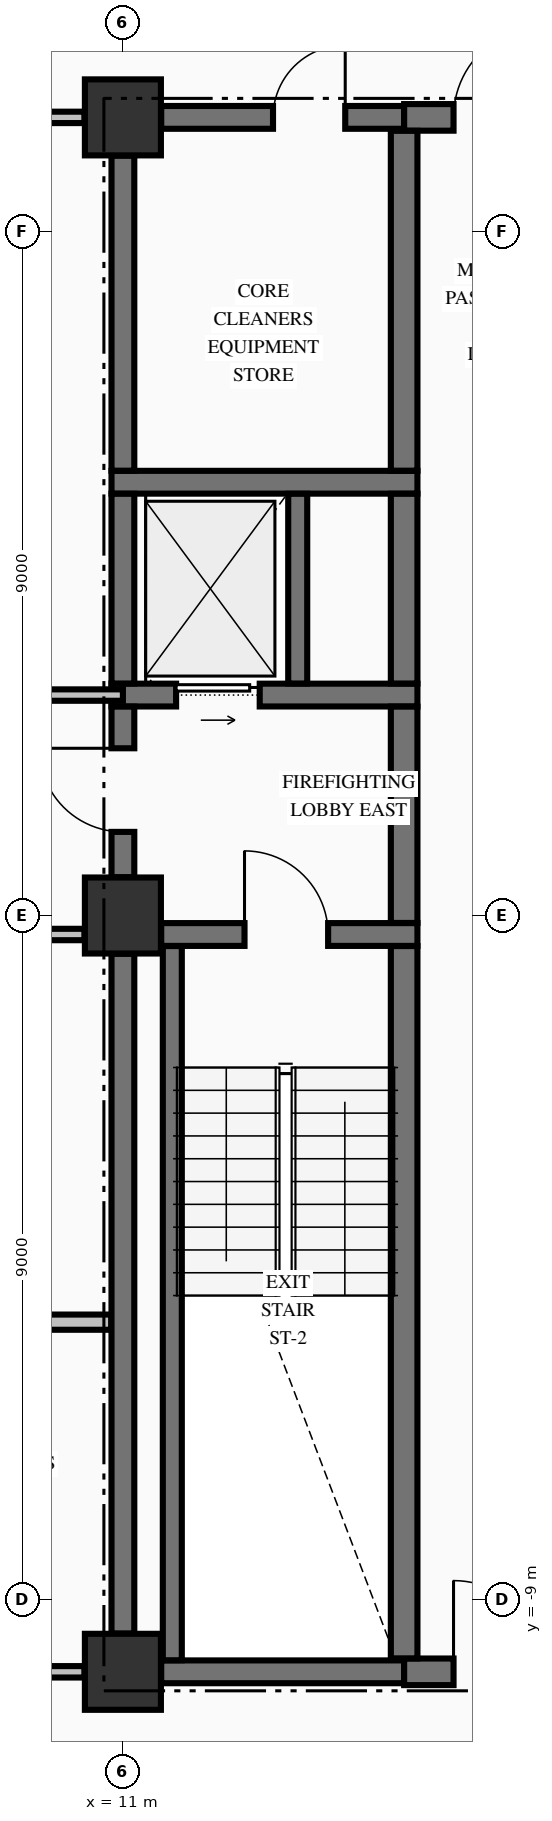
"""IFC4 building model, lengths in metres.
Left out: names, types, materials, properties, quantities, classifications, styles, units other than length and angle.
Written with IfcOpenShell. Run it as: python <this file> out.ifc"""

import sys

from ifc_helpers import new_model, si_unit, direction, frame, frame_2d, origin, origin_2d, place, context, subcontext, project, spatial, rectangle, extrude, element, fill, save


model = new_model("IFC4")
c1 = context("Model", 3, precision=1e-05, world=origin(), true_north=direction((0.0, 1.0)))
c2 = subcontext(c1, "Body", "Model", "MODEL_VIEW")
j1 = project(units=[si_unit("LENGTHUNIT", "METRE"), si_unit("PLANEANGLEUNIT", "RADIAN")], contexts=[c1])
p1 = place(None, origin())
s1 = spatial("IfcSite", under=j1, at=p1, CompositionType="ELEMENT")
p2 = place(p1, origin())
s2 = spatial("IfcBuilding", under=s1, at=p2, CompositionType="ELEMENT")
p3 = place(p2, frame((0.0, 0.0, 91.36)))
s3 = spatial("IfcBuildingStorey", under=s2, at=p3, CompositionType="ELEMENT", Elevation=91.36)
for number, where, z_axis, x_axis in (
    (1, (11.0, -9.95, -0.25), (0.0, 0.0, 1.0), (1.0, 0.0, 0.0)),
    (2, (11.0, 0.0, -0.25), (0.0, 0.0, 1.0), (1.0, 0.0, 0.0)),
    (3, (11.0, 10.5, -0.25), (0.0, 0.0, 1.0), (1.0, 0.0, 0.0)),
):
    element("IfcColumn", number, at=place(p3, frame(where, z_axis=z_axis, x_axis=x_axis)), inside=s3, PredefinedType="COLUMN", context=c2, shape_type="SweptSolid", body=[
        extrude(rectangle(XDim=1.0, YDim=1.0, at=origin_2d()), origin(), (0.0, 0.0, 1.0), 3.57),
    ])
p4 = place(p3, frame((11.504, -9.95, 0.0), z_axis=(0.0, 0.0, 1.0), x_axis=(1.0, 0.0, 0.0)))
e4 = element("IfcWall", 4, at=p4, inside=s3, PredefinedType="SHEAR", context=c2, shape_type="SweptSolid", body=[
    extrude(rectangle(XDim=3.196, YDim=0.3, at=frame_2d((1.598, 0.0))), origin(), (0.0, 0.0, 1.0), 3.32),
])
p5 = place(p3, frame((14.7, -9.95, 0.0), z_axis=(0.0, 0.0, 1.0), x_axis=(1.0, 0.0, 0.0)))
e5 = element("IfcWall", 5, at=p5, inside=s3, PredefinedType="SHEAR", context=c2, shape_type="SweptSolid", body=[
    extrude(rectangle(XDim=4.796, YDim=0.35, at=frame_2d((2.398, 0.0))), origin(), (0.0, 0.0, 1.0), 3.32),
])
p6 = place(p5, frame((0.65, 0.0, 0.0)))
e6 = element("IfcOpeningElement", 6, at=p6, cuts=e5, PredefinedType="OPENING", context=c2, shape_type="SweptSolid", body=[
    extrude(rectangle(XDim=1.2, YDim=2.15, at=frame_2d((0.6, 1.075))), frame((0.0, 0.185, 0.0), z_axis=(0.0, -1.0, 0.0), x_axis=(1.0, 0.0, 0.0)), (0.0, 0.0, 1.0), 0.37),
])
p7 = place(p3, frame((11.504, -0.25, 0.0), z_axis=(0.0, 0.0, 1.0), x_axis=(1.0, 0.0, 0.0)))
e7 = element("IfcWall", 7, at=p7, inside=s3, PredefinedType="SHEAR", context=c2, shape_type="SweptSolid", body=[
    extrude(rectangle(XDim=3.371, YDim=0.3, at=frame_2d((1.686, 0.0))), origin(), (0.0, 0.0, 1.0), 3.32),
])
p8 = place(p7, frame((1.096, 0.0, 0.0)))
e8 = element("IfcOpeningElement", 8, at=p8, cuts=e7, PredefinedType="OPENING", context=c2, shape_type="SweptSolid", body=[
    extrude(rectangle(XDim=1.1, YDim=2.15, at=frame_2d((0.55, 1.075))), frame((0.0, 0.16, 0.0), z_axis=(0.0, -1.0, 0.0), x_axis=(1.0, 0.0, 0.0)), (0.0, 0.0, 1.0), 0.32),
])
p9 = place(p3, frame((10.85, 2.9, 0.0), z_axis=(0.0, 0.0, 1.0), x_axis=(1.0, 0.0, 0.0)))
e9 = element("IfcWall", 9, at=p9, inside=s3, PredefinedType="SHEAR", context=c2, shape_type="SweptSolid", body=[
    extrude(rectangle(XDim=4.025, YDim=0.3, at=frame_2d((2.012, 0.0))), origin(), (0.0, 0.0, 1.0), 3.32),
])
p10 = place(p9, frame((0.85, 0.0, 0.0)))
e10 = element("IfcOpeningElement", 10, at=p10, cuts=e9, PredefinedType="OPENING", context=c2, shape_type="SweptSolid", body=[
    extrude(rectangle(XDim=1.1, YDim=2.2, at=frame_2d((0.55, 1.1))), frame((0.0, 0.16, 0.0), z_axis=(0.0, -1.0, 0.0), x_axis=(1.0, 0.0, 0.0)), (0.0, 0.0, 1.0), 0.32),
])
p11 = place(p3, frame((10.85, 5.7, 0.0), z_axis=(0.0, 0.0, 1.0), x_axis=(1.0, 0.0, 0.0)))
e11 = element("IfcWall", 11, at=p11, inside=s3, PredefinedType="SHEAR", context=c2, shape_type="SweptSolid", body=[
    extrude(rectangle(XDim=4.025, YDim=0.3, at=frame_2d((2.012, 0.0))), origin(), (0.0, 0.0, 1.0), 3.32),
])
p12 = place(p3, frame((11.504, 10.5, 0.0), z_axis=(0.0, 0.0, 1.0), x_axis=(1.0, 0.0, 0.0)))
e12 = element("IfcWall", 12, at=p12, inside=s3, PredefinedType="SHEAR", context=c2, shape_type="SweptSolid", body=[
    extrude(rectangle(XDim=3.196, YDim=0.3, at=frame_2d((1.598, 0.0))), origin(), (0.0, 0.0, 1.0), 3.32),
])
p13 = place(p12, frame((1.471, 0.0, 0.0)))
e13 = element("IfcOpeningElement", 13, at=p13, cuts=e12, PredefinedType="OPENING", context=c2, shape_type="SweptSolid", body=[
    extrude(rectangle(XDim=0.95, YDim=2.15, at=frame_2d((0.475, 1.075))), frame((0.0, 0.16, 0.0), z_axis=(0.0, -1.0, 0.0), x_axis=(1.0, 0.0, 0.0)), (0.0, 0.0, 1.0), 0.32),
])
p14 = place(p3, frame((14.7, 10.5, 0.0), z_axis=(0.0, 0.0, 1.0), x_axis=(1.0, 0.0, 0.0)))
e14 = element("IfcWall", 14, at=p14, inside=s3, PredefinedType="SHEAR", context=c2, shape_type="SweptSolid", body=[
    extrude(rectangle(XDim=4.796, YDim=0.35, at=frame_2d((2.398, 0.0))), origin(), (0.0, 0.0, 1.0), 3.32),
])
p15 = place(p14, frame((0.65, 0.0, 0.0)))
e15 = element("IfcOpeningElement", 15, at=p15, cuts=e14, PredefinedType="OPENING", context=c2, shape_type="SweptSolid", body=[
    extrude(rectangle(XDim=1.2, YDim=2.15, at=frame_2d((0.6, 1.075))), frame((0.0, 0.185, 0.0), z_axis=(0.0, -1.0, 0.0), x_axis=(1.0, 0.0, 0.0)), (0.0, 0.0, 1.0), 0.37),
])
p16 = place(p14, frame((3.25, 0.0, 0.0)))
e16 = element("IfcOpeningElement", 16, at=p16, cuts=e14, PredefinedType="OPENING", context=c2, shape_type="SweptSolid", body=[
    extrude(rectangle(XDim=0.9, YDim=2.15, at=frame_2d((0.45, 1.075))), frame((0.0, 0.185, 0.0), z_axis=(0.0, -1.0, 0.0), x_axis=(1.0, 0.0, 0.0)), (0.0, 0.0, 1.0), 0.37),
])
p17 = place(p3, frame((-10.494, -9.95, 0.0), z_axis=(0.0, 0.0, 1.0), x_axis=(1.0, 0.0, 0.0)))
e17 = element("IfcWall", 17, at=p17, inside=s3, PredefinedType="PARTITIONING", context=c2, shape_type="SweptSolid", body=[
    extrude(rectangle(XDim=20.988, YDim=0.15, at=frame_2d((10.494, 0.0))), origin(), (0.0, 0.0, 1.0), 3.32),
])
p18 = place(p17, frame((8.194, 0.0, 0.0)))
e18 = element("IfcOpeningElement", 18, at=p18, cuts=e17, PredefinedType="OPENING", context=c2, shape_type="SweptSolid", body=[
    extrude(rectangle(XDim=1.1, YDim=2.15, at=frame_2d((0.55, 1.075))), frame((0.0, 0.085, 0.0), z_axis=(0.0, -1.0, 0.0), x_axis=(1.0, 0.0, 0.0)), (0.0, 0.0, 1.0), 0.17),
])
p19 = place(p17, frame((13.619, 0.0, 0.0)))
e19 = element("IfcOpeningElement", 19, at=p19, cuts=e17, PredefinedType="OPENING", context=c2, shape_type="SweptSolid", body=[
    extrude(rectangle(XDim=0.95, YDim=2.15, at=frame_2d((0.475, 1.075))), frame((0.0, 0.085, 0.0), z_axis=(0.0, -1.0, 0.0), x_axis=(1.0, 0.0, 0.0)), (0.0, 0.0, 1.0), 0.17),
])
p20 = place(p17, frame((17.844, 0.0, 0.0)))
e20 = element("IfcOpeningElement", 20, at=p20, cuts=e17, PredefinedType="OPENING", context=c2, shape_type="SweptSolid", body=[
    extrude(rectangle(XDim=0.9, YDim=2.15, at=frame_2d((0.45, 1.075))), frame((0.0, 0.085, 0.0), z_axis=(0.0, -1.0, 0.0), x_axis=(1.0, 0.0, 0.0)), (0.0, 0.0, 1.0), 0.17),
])
p21 = place(p3, frame((-0.725, -5.35, 0.0), z_axis=(0.0, 0.0, 1.0), x_axis=(1.0, 0.0, 0.0)))
e21 = element("IfcWall", 21, at=p21, inside=s3, PredefinedType="PARTITIONING", context=c2, shape_type="SweptSolid", body=[
    extrude(rectangle(XDim=11.572, YDim=0.2, at=frame_2d((5.786, 0.0))), origin(), (0.0, 0.0, 1.0), 3.32),
])
p22 = place(p3, frame((-10.494, -0.25, 0.0), z_axis=(0.0, 0.0, 1.0), x_axis=(1.0, 0.0, 0.0)))
e22 = element("IfcWall", 22, at=p22, inside=s3, PredefinedType="PARTITIONING", context=c2, shape_type="SweptSolid", body=[
    extrude(rectangle(XDim=20.988, YDim=0.15, at=frame_2d((10.494, 0.0))), origin(), (0.0, 0.0, 1.0), 3.32),
])
p23 = place(p22, frame((8.194, 0.0, 0.0)))
e23 = element("IfcOpeningElement", 23, at=p23, cuts=e22, PredefinedType="OPENING", context=c2, shape_type="SweptSolid", body=[
    extrude(rectangle(XDim=1.1, YDim=2.15, at=frame_2d((0.55, 1.075))), frame((0.0, 0.085, 0.0), z_axis=(0.0, -1.0, 0.0), x_axis=(1.0, 0.0, 0.0)), (0.0, 0.0, 1.0), 0.17),
])
p24 = place(p22, frame((3.049, 0.0, 0.0)))
e24 = element("IfcOpeningElement", 24, at=p24, cuts=e22, PredefinedType="OPENING", context=c2, shape_type="SweptSolid", body=[
    extrude(rectangle(XDim=1.05, YDim=2.15, at=frame_2d((0.525, 1.075))), frame((0.0, 0.085, 0.0), z_axis=(0.0, -1.0, 0.0), x_axis=(1.0, 0.0, 0.0)), (0.0, 0.0, 1.0), 0.17),
])
p25 = place(p22, frame((15.189, 0.0, 0.0)))
e25 = element("IfcOpeningElement", 25, at=p25, cuts=e22, PredefinedType="OPENING", context=c2, shape_type="SweptSolid", body=[
    extrude(rectangle(XDim=0.95, YDim=2.15, at=frame_2d((0.475, 1.075))), frame((0.0, 0.085, 0.0), z_axis=(0.0, -1.0, 0.0), x_axis=(1.0, 0.0, 0.0)), (0.0, 0.0, 1.0), 0.17),
])
p26 = place(p3, frame((-11.0, 2.9, 0.0), z_axis=(0.0, 0.0, 1.0), x_axis=(1.0, 0.0, 0.0)))
e26 = element("IfcWall", 26, at=p26, inside=s3, PredefinedType="PARTITIONING", context=c2, shape_type="SweptSolid", body=[
    extrude(rectangle(XDim=22.0, YDim=0.15, at=frame_2d((11.0, 0.0))), origin(), (0.0, 0.0, 1.0), 3.32),
])
p27 = place(p26, frame((8.7, 0.0, 0.0)))
e27 = element("IfcOpeningElement", 27, at=p27, cuts=e26, PredefinedType="OPENING", context=c2, shape_type="SweptSolid", body=[
    extrude(rectangle(XDim=1.1, YDim=2.15, at=frame_2d((0.55, 1.075))), frame((0.0, 0.085, 0.0), z_axis=(0.0, -1.0, 0.0), x_axis=(1.0, 0.0, 0.0)), (0.0, 0.0, 1.0), 0.17),
])
p28 = place(p26, frame((3.555, 0.0, 0.0)))
e28 = element("IfcOpeningElement", 28, at=p28, cuts=e26, PredefinedType="OPENING", context=c2, shape_type="SweptSolid", body=[
    extrude(rectangle(XDim=1.05, YDim=2.15, at=frame_2d((0.525, 1.075))), frame((0.0, 0.085, 0.0), z_axis=(0.0, -1.0, 0.0), x_axis=(1.0, 0.0, 0.0)), (0.0, 0.0, 1.0), 0.17),
])
p29 = place(p26, frame((15.62, 0.0, 0.0)))
e29 = element("IfcOpeningElement", 29, at=p29, cuts=e26, PredefinedType="OPENING", context=c2, shape_type="SweptSolid", body=[
    extrude(rectangle(XDim=1.1, YDim=2.15, at=frame_2d((0.55, 1.075))), frame((0.0, 0.085, 0.0), z_axis=(0.0, -1.0, 0.0), x_axis=(1.0, 0.0, 0.0)), (0.0, 0.0, 1.0), 0.17),
])
p30 = place(p3, frame((-10.494, 10.5, 0.0), z_axis=(0.0, 0.0, 1.0), x_axis=(1.0, 0.0, 0.0)))
e30 = element("IfcWall", 30, at=p30, inside=s3, PredefinedType="PARTITIONING", context=c2, shape_type="SweptSolid", body=[
    extrude(rectangle(XDim=20.988, YDim=0.15, at=frame_2d((10.494, 0.0))), origin(), (0.0, 0.0, 1.0), 3.32),
])
p31 = place(p30, frame((8.194, 0.0, 0.0)))
e31 = element("IfcOpeningElement", 31, at=p31, cuts=e30, PredefinedType="OPENING", context=c2, shape_type="SweptSolid", body=[
    extrude(rectangle(XDim=1.1, YDim=2.15, at=frame_2d((0.55, 1.075))), frame((0.0, 0.085, 0.0), z_axis=(0.0, -1.0, 0.0), x_axis=(1.0, 0.0, 0.0)), (0.0, 0.0, 1.0), 0.17),
])
p32 = place(p3, frame((11.0, -9.446, 0.0), z_axis=(0.0, 0.0, 1.0), x_axis=(0.0, 1.0, 0.0)))
e32 = element("IfcWall", 32, at=p32, inside=s3, PredefinedType="SHEAR", context=c2, shape_type="SweptSolid", body=[
    extrude(rectangle(XDim=8.942, YDim=0.3, at=frame_2d((4.471, 0.0))), origin(), (0.0, 0.0, 1.0), 3.32),
])
p33 = place(p3, frame((11.0, 0.504, 0.0), z_axis=(0.0, 0.0, 1.0), x_axis=(0.0, 1.0, 0.0)))
e33 = element("IfcWall", 33, at=p33, inside=s3, PredefinedType="SHEAR", context=c2, shape_type="SweptSolid", body=[
    extrude(rectangle(XDim=2.244, YDim=0.3, at=frame_2d((1.122, 0.0))), origin(), (0.0, 0.0, 1.0), 3.32),
])
p34 = place(p33, frame((0.596, 0.0, 0.0)))
e34 = element("IfcOpeningElement", 34, at=p34, cuts=e33, PredefinedType="OPENING", context=c2, shape_type="SweptSolid", body=[
    extrude(rectangle(XDim=1.1, YDim=2.15, at=frame_2d((0.55, 1.075))), frame((0.0, 0.16, 0.0), z_axis=(0.0, -1.0, 0.0), x_axis=(1.0, 0.0, 0.0)), (0.0, 0.0, 1.0), 0.32),
])
p35 = place(p3, frame((11.0, 3.052, 0.0), z_axis=(0.0, 0.0, 1.0), x_axis=(0.0, 1.0, 0.0)))
e35 = element("IfcWall", 35, at=p35, inside=s3, PredefinedType="SHEAR", context=c2, shape_type="SweptSolid", body=[
    extrude(rectangle(XDim=2.496, YDim=0.3, at=frame_2d((1.248, 0.0))), origin(), (0.0, 0.0, 1.0), 3.32),
])
p36 = place(p3, frame((11.0, 5.852, 0.0), z_axis=(0.0, 0.0, 1.0), x_axis=(0.0, 1.0, 0.0)))
e36 = element("IfcWall", 36, at=p36, inside=s3, PredefinedType="SHEAR", context=c2, shape_type="SweptSolid", body=[
    extrude(rectangle(XDim=4.144, YDim=0.3, at=frame_2d((2.072, 0.0))), origin(), (0.0, 0.0, 1.0), 3.32),
])
p37 = place(p3, frame((11.65, -9.798, 0.0), z_axis=(0.0, 0.0, 1.0), x_axis=(0.0, 1.0, 0.0)))
e37 = element("IfcWall", 37, at=p37, inside=s3, PredefinedType="SOLIDWALL", context=c2, shape_type="SweptSolid", body=[
    extrude(rectangle(XDim=9.396, YDim=0.25, at=frame_2d((4.698, 0.0))), origin(), (0.0, 0.0, 1.0), 3.32),
])
p38 = place(p3, frame((13.3, 3.052, 0.0), z_axis=(0.0, 0.0, 1.0), x_axis=(0.0, 1.0, 0.0)))
e38 = element("IfcWall", 38, at=p38, inside=s3, PredefinedType="SOLIDWALL", context=c2, shape_type="SweptSolid", body=[
    extrude(rectangle(XDim=2.496, YDim=0.25, at=frame_2d((1.248, 0.0))), origin(), (0.0, 0.0, 1.0), 3.32),
])
p39 = place(p3, frame((14.7, -9.773, 0.0), z_axis=(0.0, 0.0, 1.0), x_axis=(0.0, 1.0, 0.0)))
e39 = element("IfcWall", 39, at=p39, inside=s3, PredefinedType="SHEAR", context=c2, shape_type="SweptSolid", body=[
    extrude(rectangle(XDim=9.371, YDim=0.35, at=frame_2d((4.686, 0.0))), origin(), (0.0, 0.0, 1.0), 3.32),
])
p40 = place(p3, frame((14.7, -0.098, 0.0), z_axis=(0.0, 0.0, 1.0), x_axis=(0.0, 1.0, 0.0)))
e40 = element("IfcWall", 40, at=p40, inside=s3, PredefinedType="SHEAR", context=c2, shape_type="SweptSolid", body=[
    extrude(rectangle(XDim=2.846, YDim=0.35, at=frame_2d((1.423, 0.0))), origin(), (0.0, 0.0, 1.0), 3.32),
])
p41 = place(p3, frame((14.7, 3.052, 0.0), z_axis=(0.0, 0.0, 1.0), x_axis=(0.0, 1.0, 0.0)))
e41 = element("IfcWall", 41, at=p41, inside=s3, PredefinedType="SHEAR", context=c2, shape_type="SweptSolid", body=[
    extrude(rectangle(XDim=2.496, YDim=0.35, at=frame_2d((1.248, 0.0))), origin(), (0.0, 0.0, 1.0), 3.32),
])
p42 = place(p3, frame((14.7, 5.852, 0.0), z_axis=(0.0, 0.0, 1.0), x_axis=(0.0, 1.0, 0.0)))
e42 = element("IfcWall", 42, at=p42, inside=s3, PredefinedType="SHEAR", context=c2, shape_type="SweptSolid", body=[
    extrude(rectangle(XDim=4.471, YDim=0.35, at=frame_2d((2.235, 0.0))), origin(), (0.0, 0.0, 1.0), 3.32),
])
p43 = place(p8, origin())
e43 = element("IfcDoor", 43, at=p43, inside=s3, OperationType="SINGLE_SWING_LEFT", PredefinedType="DOOR", context=c2, shape_type="SweptSolid", body=[
    extrude(rectangle(XDim=1.1, YDim=2.15, at=frame_2d((0.55, 1.075))), frame((0.0, 0.025, 0.0), z_axis=(0.0, -1.0, 0.0), x_axis=(1.0, 0.0, 0.0)), (0.0, 0.0, 1.0), 0.05),
])
fill(e8, e43)
p44 = place(p34, origin())
e44 = element("IfcDoor", 44, at=p44, inside=s3, OperationType="SINGLE_SWING_RIGHT", PredefinedType="DOOR", context=c2, shape_type="SweptSolid", body=[
    extrude(rectangle(XDim=1.1, YDim=2.15, at=frame_2d((0.55, 1.075))), frame((0.0, 0.025, 0.0), z_axis=(0.0, -1.0, 0.0), x_axis=(1.0, 0.0, 0.0)), (0.0, 0.0, 1.0), 0.05),
])
fill(e34, e44)
p45 = place(p10, origin())
e45 = element("IfcDoor", 45, at=p45, inside=s3, OperationType="SLIDING_TO_RIGHT", PredefinedType="DOOR", context=c2, shape_type="SweptSolid", body=[
    extrude(rectangle(XDim=1.1, YDim=2.2, at=frame_2d((0.55, 1.1))), frame((0.0, 0.025, 0.0), z_axis=(0.0, -1.0, 0.0), x_axis=(1.0, 0.0, 0.0)), (0.0, 0.0, 1.0), 0.05),
])
fill(e10, e45)
p46 = place(p13, origin())
e46 = element("IfcDoor", 46, at=p46, inside=s3, OperationType="SINGLE_SWING_RIGHT", PredefinedType="DOOR", context=c2, shape_type="SweptSolid", body=[
    extrude(rectangle(XDim=0.95, YDim=2.15, at=frame_2d((0.475, 1.075))), frame((0.0, 0.025, 0.0), z_axis=(0.0, -1.0, 0.0), x_axis=(1.0, 0.0, 0.0)), (0.0, 0.0, 1.0), 0.05),
])
fill(e13, e46)
p47 = place(p6, origin())
e47 = element("IfcDoor", 47, at=p47, inside=s3, OperationType="SINGLE_SWING_LEFT", PredefinedType="DOOR", context=c2, shape_type="SweptSolid", body=[
    extrude(rectangle(XDim=1.2, YDim=2.15, at=frame_2d((0.6, 1.075))), frame((0.0, 0.025, 0.0), z_axis=(0.0, -1.0, 0.0), x_axis=(1.0, 0.0, 0.0)), (0.0, 0.0, 1.0), 0.05),
])
fill(e6, e47)
p48 = place(p15, origin())
e48 = element("IfcDoor", 48, at=p48, inside=s3, OperationType="SINGLE_SWING_RIGHT", PredefinedType="DOOR", context=c2, shape_type="SweptSolid", body=[
    extrude(rectangle(XDim=1.2, YDim=2.15, at=frame_2d((0.6, 1.075))), frame((0.0, 0.025, 0.0), z_axis=(0.0, -1.0, 0.0), x_axis=(1.0, 0.0, 0.0)), (0.0, 0.0, 1.0), 0.05),
])
fill(e15, e48)
save(model, sys.argv[1])
